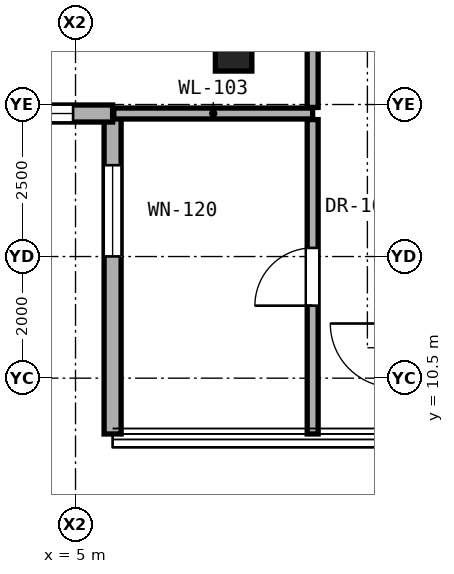
"""IFC4 building model, lengths in metres.
Left out: names, types, materials, properties, quantities, classifications, styles, units other than length and angle.
Written with IfcOpenShell. Run it as: python <this file> out.ifc"""

import sys

from ifc_helpers import new_model, si_unit, direction, frame, frame_2d, origin, origin_2d, place, context, subcontext, project, spatial, rectangle, extrude, element, fill, save


model = new_model("IFC4")
c1 = context("Model", 3, precision=1e-05, world=origin(), true_north=direction((0.0, 1.0)))
c2 = subcontext(c1, "Body", "Model", "MODEL_VIEW")
j1 = project(units=[si_unit("LENGTHUNIT", "METRE"), si_unit("PLANEANGLEUNIT", "RADIAN")], contexts=[c1])
p1 = place(None, origin())
s1 = spatial("IfcSite", under=j1, at=p1, CompositionType="ELEMENT")
p2 = place(p1, origin())
s2 = spatial("IfcBuilding", under=s1, at=p2, CompositionType="ELEMENT")
p3 = place(p2, frame((0.0, 0.0, 121.4)))
s3 = spatial("IfcBuildingStorey", under=s2, at=p3, CompositionType="ELEMENT", Elevation=121.4)
p4 = place(p3, frame((7.6, 16.0, 0.0), z_axis=(0.0, 0.0, 1.0), x_axis=(1.0, 0.0, 0.0)))
e1 = element("IfcColumn", 1, at=p4, inside=s3, PredefinedType="PILASTER", context=c2, shape_type="SweptSolid", body=[
    extrude(rectangle(XDim=0.6, YDim=0.9, at=origin_2d()), origin(), (0.0, 0.0, 1.0), 3.3),
])
p5 = place(p3, frame((5.61, 14.852, 0.0), z_axis=(0.0, 0.0, 1.0), x_axis=(0.0, -1.0, 0.0)))
e2 = element("IfcWall", 2, at=p5, inside=s3, PredefinedType="SOLIDWALL", context=c2, shape_type="SweptSolid", body=[
    extrude(rectangle(XDim=5.27, YDim=0.28, at=frame_2d((2.635, 0.0))), origin(), (0.0, 0.0, 1.0), 3.06),
])
p6 = place(p5, frame((0.85, 0.0, 0.81)))
e3 = element("IfcOpeningElement", 3, at=p6, cuts=e2, PredefinedType="OPENING", context=c2, shape_type="SweptSolid", body=[
    extrude(rectangle(XDim=1.5, YDim=2.1, at=frame_2d((0.75, 1.05))), frame((0.0, 0.15, 0.0), z_axis=(0.0, -1.0, 0.0), x_axis=(1.0, 0.0, 0.0)), (0.0, 0.0, 1.0), 0.3),
])
p7 = place(p3, frame((0.34, 14.852, 0.0), z_axis=(0.0, 0.0, 1.0), x_axis=(1.0, 0.0, 0.0)))
e4 = element("IfcWall", 4, at=p7, inside=s3, PredefinedType="SOLIDWALL", context=c2, shape_type="SweptSolid", body=[
    extrude(rectangle(XDim=5.27, YDim=0.28, at=frame_2d((2.635, 0.0))), origin(), (0.0, 0.0, 1.0), 3.06),
])
p8 = place(p7, frame((3.52, 0.0, 0.85)))
e5 = element("IfcOpeningElement", 5, at=p8, cuts=e4, PredefinedType="OPENING", context=c2, shape_type="SweptSolid", body=[
    extrude(rectangle(XDim=1.1, YDim=2.0, at=frame_2d((0.55, 1.0))), frame((0.0, 0.15, 0.0), z_axis=(0.0, -1.0, 0.0), x_axis=(1.0, 0.0, 0.0)), (0.0, 0.0, 1.0), 0.3),
])
p9 = place(p3, frame((5.63, 14.852, 0.0), z_axis=(0.0, 0.0, 1.0), x_axis=(1.0, 0.0, 0.0)))
e6 = element("IfcWall", 6, at=p9, inside=s3, PredefinedType="PARTITIONING", context=c2, shape_type="SweptSolid", body=[
    extrude(rectangle(XDim=3.27, YDim=0.18, at=frame_2d((1.635, 0.0))), origin(), (0.0, 0.0, 1.0), 3.08),
])
p10 = place(p3, frame((8.9, 9.582, 0.0), z_axis=(0.0, 0.0, 1.0), x_axis=(0.0, 1.0, 0.0)))
e7 = element("IfcWall", 7, at=p10, inside=s3, PredefinedType="PARTITIONING", context=c2, shape_type="SweptSolid", body=[
    extrude(rectangle(XDim=5.17, YDim=0.18, at=frame_2d((2.585, 0.0))), origin(), (0.0, 0.0, 1.0), 3.08),
])
p11 = place(p10, frame((2.11, 0.0, 0.0)))
e8 = element("IfcOpeningElement", 8, at=p11, cuts=e7, PredefinedType="OPENING", context=c2, shape_type="SweptSolid", body=[
    extrude(rectangle(XDim=0.95, YDim=2.15, at=frame_2d((0.475, 1.075))), frame((0.0, 0.1, 0.0), z_axis=(0.0, -1.0, 0.0), x_axis=(1.0, 0.0, 0.0)), (0.0, 0.0, 1.0), 0.2),
])
p12 = place(p3, frame((8.9, 14.952, 0.0), z_axis=(0.0, 0.0, 1.0), x_axis=(0.0, 1.0, 0.0)))
e9 = element("IfcWall", 9, at=p12, inside=s3, PredefinedType="PARTITIONING", context=c2, shape_type="SweptSolid", body=[
    extrude(rectangle(XDim=5.609, YDim=0.18, at=frame_2d((2.805, 0.0))), origin(), (0.0, 0.0, 1.0), 2.456),
])
p13 = place(p12, frame((2.28, 0.0, 0.0)))
e10 = element("IfcOpeningElement", 10, at=p13, cuts=e9, PredefinedType="OPENING", context=c2, shape_type="SweptSolid", body=[
    extrude(rectangle(XDim=1.05, YDim=2.2, at=frame_2d((0.525, 1.1))), frame((0.0, 0.1, 0.0), z_axis=(0.0, -1.0, 0.0), x_axis=(1.0, 0.0, 0.0)), (0.0, 0.0, 1.0), 0.2),
])
p14 = place(p6, origin())
e11 = element("IfcWindow", 11, at=p14, inside=s3, PartitioningType="SINGLE_PANEL", PredefinedType="WINDOW", context=c2, shape_type="SweptSolid", body=[
    extrude(rectangle(XDim=1.5, YDim=2.1, at=frame_2d((0.75, 1.05))), frame((0.0, 0.03, 0.0), z_axis=(0.0, -1.0, 0.0), x_axis=(1.0, 0.0, 0.0)), (0.0, 0.0, 1.0), 0.06),
])
fill(e3, e11)
p15 = place(p8, origin())
e12 = element("IfcWindow", 12, at=p15, inside=s3, PartitioningType="SINGLE_PANEL", PredefinedType="WINDOW", context=c2, shape_type="SweptSolid", body=[
    extrude(rectangle(XDim=1.1, YDim=2.0, at=frame_2d((0.55, 1.0))), frame((0.0, 0.03, 0.0), z_axis=(0.0, -1.0, 0.0), x_axis=(1.0, 0.0, 0.0)), (0.0, 0.0, 1.0), 0.06),
])
fill(e5, e12)
p16 = place(p11, origin())
e13 = element("IfcDoor", 13, at=p16, inside=s3, OperationType="SINGLE_SWING_LEFT", PredefinedType="DOOR", context=c2, shape_type="SweptSolid", body=[
    extrude(rectangle(XDim=0.95, YDim=2.15, at=frame_2d((0.475, 1.075))), frame((0.0, 0.025, 0.0), z_axis=(0.0, -1.0, 0.0), x_axis=(1.0, 0.0, 0.0)), (0.0, 0.0, 1.0), 0.05),
])
fill(e8, e13)
save(model, sys.argv[1])
